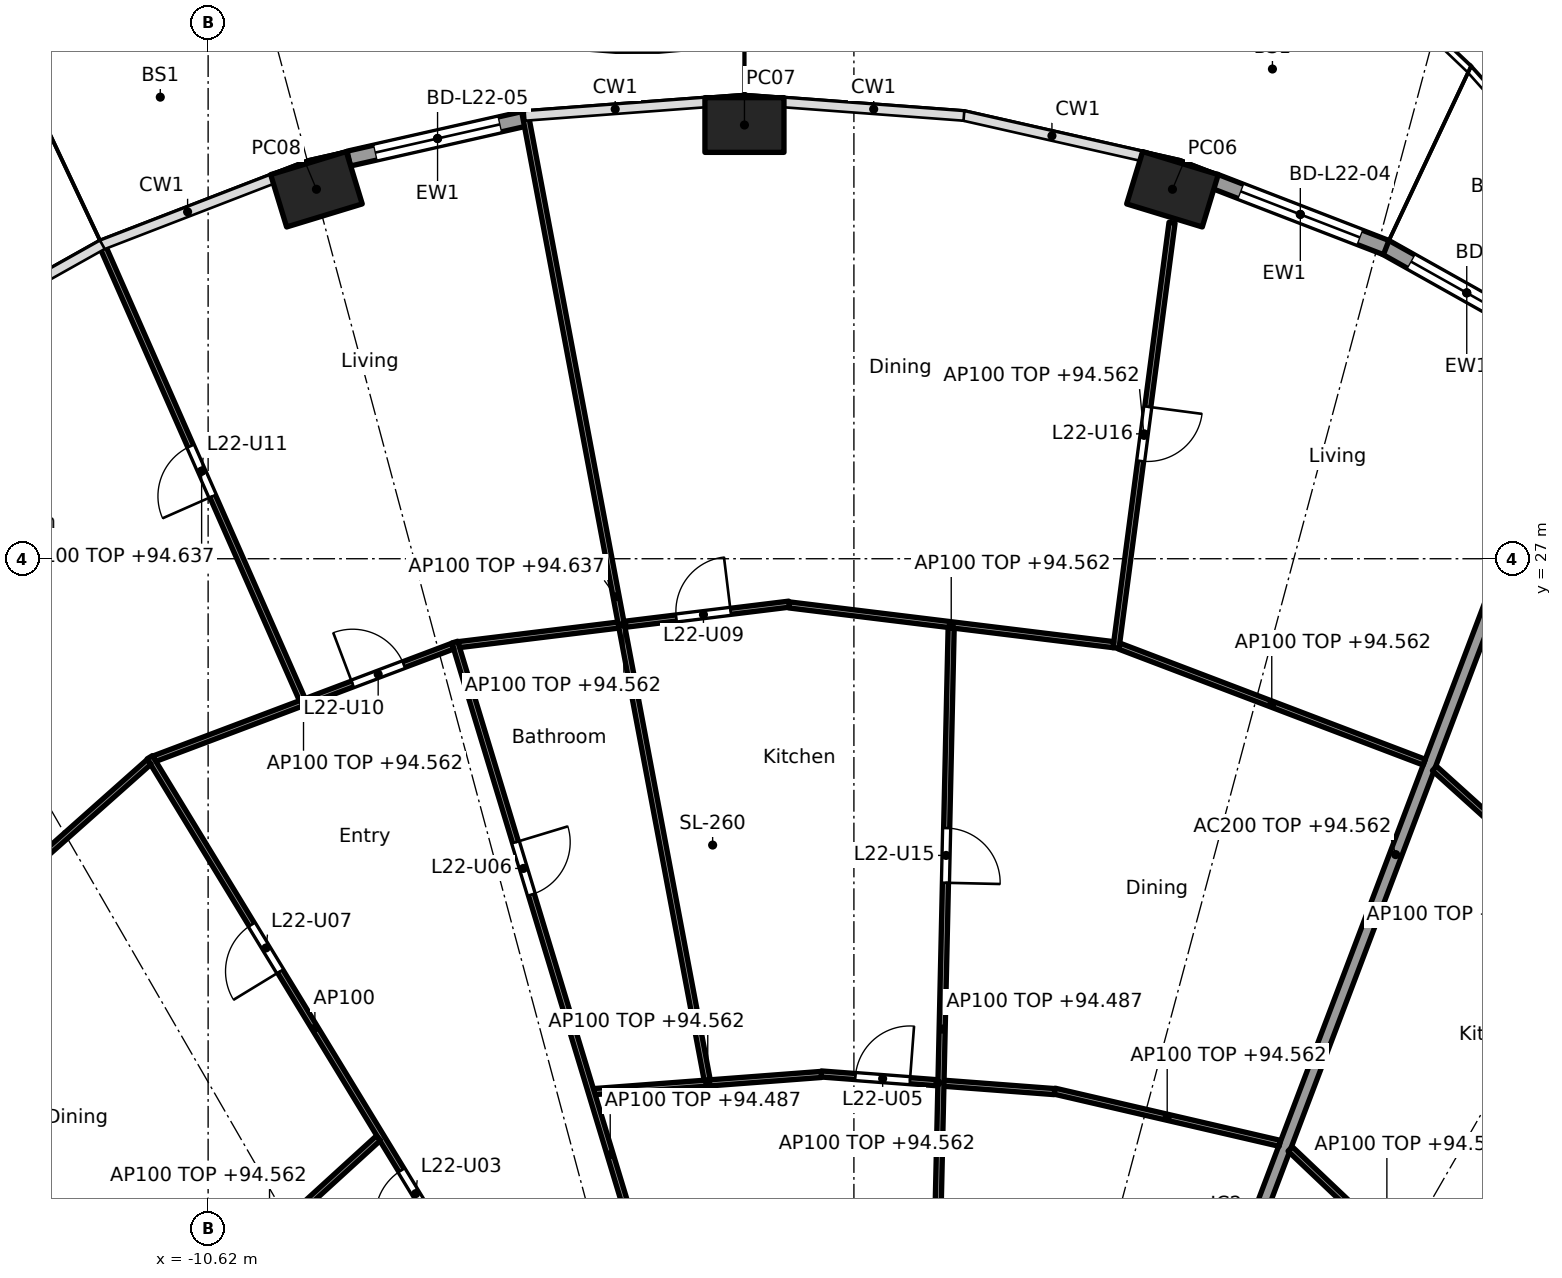
"""IFC4 building model, lengths in metres.
Left out: names, types, materials, properties, quantities, classifications, styles, units other than length and angle.
Written with IfcOpenShell. Run it as: python <this file> out.ifc"""

import sys

from ifc_helpers import new_model, si_unit, direction, frame, frame_2d, origin, origin_2d, place, context, subcontext, project, spatial, rectangle, hollow_rectangle, extrude, element, fill, save


model = new_model("IFC4")
c1 = context("Model", 3, precision=1e-05, world=origin(), true_north=direction((0.0, 1.0)))
c2 = subcontext(c1, "Body", "Model", "MODEL_VIEW")
j1 = project(units=[si_unit("LENGTHUNIT", "METRE"), si_unit("PLANEANGLEUNIT", "RADIAN")], contexts=[c1])
p1 = place(None, origin())
s1 = spatial("IfcSite", under=j1, at=p1, CompositionType="ELEMENT")
p2 = place(p1, origin())
s2 = spatial("IfcBuilding", under=s1, at=p2, CompositionType="ELEMENT")
p3 = place(p2, frame((0.0, 0.0, 91.8)))
s3 = spatial("IfcBuildingStorey", under=s2, at=p3, CompositionType="ELEMENT", Elevation=91.8)
for number, where, z_axis, x_axis in (
    (1, (5.239, 33.076, 0.0), (0.0, 0.0, 1.0), (-0.957, 0.292, 0.0)),
    (2, (-1.8, 34.133, 0.0), (0.0, 0.0, 1.0), (-1.0, 0.0, 0.0)),
    (3, (-8.839, 33.076, 0.0), (0.0, 0.0, 1.0), (-0.957, -0.292, 0.0)),
):
    element("IfcColumn", number, at=place(p3, frame(where, z_axis=z_axis, x_axis=x_axis)), inside=s3, PredefinedType="COLUMN", context=c2, shape_type="SweptSolid", body=[
        extrude(hollow_rectangle(XDim=1.3, YDim=0.9, WallThickness=0.045, at=origin_2d()), origin(), (0.0, 0.0, 1.0), 3.7),
    ])
p4 = place(p3, frame((8.737, 32.125, 0.0), z_axis=(0.0, 0.0, 1.0), x_axis=(0.872071158476, -0.489379090843, 0.0)))
e4 = element("IfcWall", 4, at=p4, inside=s3, PredefinedType="SOLIDWALL", context=c2, shape_type="SweptSolid", body=[
    extrude(rectangle(XDim=3.076, YDim=0.25, at=frame_2d((1.538, 0.0))), origin(), (0.0, 0.0, 1.0), 3.44),
])
p5 = place(p4, frame((0.488, 0.0, 0.0)))
e5 = element("IfcOpeningElement", 5, at=p5, cuts=e4, PredefinedType="OPENING", context=c2, shape_type="SweptSolid", body=[
    extrude(rectangle(XDim=2.1, YDim=2.4, at=frame_2d((1.05, 1.2))), frame((0.0, 0.135, 0.0), z_axis=(0.0, -1.0, 0.0), x_axis=(1.0, 0.0, 0.0)), (0.0, 0.0, 1.0), 0.27),
])
p6 = place(p3, frame((5.929, 33.208, 0.0), z_axis=(0.0, 0.0, 1.0), x_axis=(0.932837560624, -0.360297218263, 0.0)))
e6 = element("IfcWall", 6, at=p6, inside=s3, PredefinedType="SOLIDWALL", context=c2, shape_type="SweptSolid", body=[
    extrude(rectangle(XDim=3.028, YDim=0.25, at=frame_2d((1.514, 0.0))), origin(), (0.0, 0.0, 1.0), 3.44),
])
p7 = place(p6, frame((0.464, 0.0, 0.0)))
e7 = element("IfcOpeningElement", 7, at=p7, cuts=e6, PredefinedType="OPENING", context=c2, shape_type="SweptSolid", body=[
    extrude(rectangle(XDim=2.1, YDim=2.4, at=frame_2d((1.05, 1.2))), frame((0.0, 0.135, 0.0), z_axis=(0.0, -1.0, 0.0), x_axis=(1.0, 0.0, 0.0)), (0.0, 0.0, 1.0), 0.27),
])
p8 = place(p3, frame((-8.306, 33.58, 0.0), z_axis=(0.0, 0.0, 1.0), x_axis=(0.975317607872, 0.220806620767, 0.0)))
e8 = element("IfcWall", 8, at=p8, inside=s3, PredefinedType="SOLIDWALL", context=c2, shape_type="SweptSolid", body=[
    extrude(rectangle(XDim=2.993, YDim=0.25, at=frame_2d((1.497, 0.0))), origin(), (0.0, 0.0, 1.0), 3.44),
])
p9 = place(p8, frame((0.447, 0.0, 0.0)))
e9 = element("IfcOpeningElement", 9, at=p9, cuts=e8, PredefinedType="OPENING", context=c2, shape_type="SweptSolid", body=[
    extrude(rectangle(XDim=2.1, YDim=2.4, at=frame_2d((1.05, 1.2))), frame((0.0, 0.135, 0.0), z_axis=(0.0, -1.0, 0.0), x_axis=(1.0, 0.0, 0.0)), (0.0, 0.0, 1.0), 0.27),
])
p10 = place(p3, frame((6.141, 14.829, 0.0), z_axis=(0.0, 0.0, 1.0), x_axis=(0.354477134193, 0.935064682968, 0.0)))
e10 = element("IfcWall", 10, at=p10, inside=s3, PredefinedType="PARTITIONING", context=c2, shape_type="SweptSolid", body=[
    extrude(rectangle(XDim=15.626, YDim=0.2, at=frame_2d((7.813, 0.0))), origin(), (0.0, 0.0, 1.0), 2.762),
])
p11 = place(p3, frame((10.364, 14.198, 0.0), z_axis=(0.0, 0.0, 1.0), x_axis=(0.552104552927, 0.833774887267, 0.0)))
e11 = element("IfcWall", 11, at=p11, inside=s3, PredefinedType="PARTITIONING", context=c2, shape_type="SweptSolid", body=[
    extrude(rectangle(XDim=12.407, YDim=0.1, at=frame_2d((6.203, 0.0))), origin(), (0.0, 0.0, 1.0), 2.762),
])
p12 = place(p11, frame((8.988, 0.0, 0.0)))
e12 = element("IfcOpeningElement", 12, at=p12, cuts=e11, PredefinedType="OPENING", context=c2, shape_type="SweptSolid", body=[
    extrude(rectangle(XDim=0.9, YDim=2.1, at=frame_2d((0.45, 1.05))), frame((0.0, 0.06, 0.0), z_axis=(0.0, -1.0, 0.0), x_axis=(1.0, 0.0, 0.0)), (0.0, 0.0, 1.0), 0.12),
])
p13 = place(p11, frame((2.809, 0.0, 0.0)))
e13 = element("IfcOpeningElement", 13, at=p13, cuts=e11, PredefinedType="OPENING", context=c2, shape_type="SweptSolid", body=[
    extrude(rectangle(XDim=0.9, YDim=2.1, at=frame_2d((0.45, 1.05))), frame((0.0, 0.06, 0.0), z_axis=(0.0, -1.0, 0.0), x_axis=(1.0, 0.0, 0.0)), (0.0, 0.0, 1.0), 0.12),
])
p14 = place(p3, frame((10.355, 14.274, 0.0), z_axis=(0.0, 0.0, 1.0), x_axis=(-0.725206433622, 0.688531501555, 0.0)))
e14 = element("IfcWall", 14, at=p14, inside=s3, PredefinedType="PARTITIONING", context=c2, shape_type="SweptSolid", body=[
    extrude(rectangle(XDim=4.387, YDim=0.1, at=frame_2d((2.193, 0.0))), origin(), (0.0, 0.0, 1.0), 2.762),
])
p15 = place(p14, frame((0.907, 0.0, 0.0)))
e15 = element("IfcOpeningElement", 15, at=p15, cuts=e14, PredefinedType="OPENING", context=c2, shape_type="SweptSolid", body=[
    extrude(rectangle(XDim=0.9, YDim=2.1, at=frame_2d((0.45, 1.05))), frame((0.0, 0.06, 0.0), z_axis=(0.0, -1.0, 0.0), x_axis=(1.0, 0.0, 0.0)), (0.0, 0.0, 1.0), 0.12),
])
p16 = place(p3, frame((13.898, 19.625, 0.0), z_axis=(0.0, 0.0, 1.0), x_axis=(-0.742396654702, 0.669960601146, 0.0)))
e16 = element("IfcWall", 16, at=p16, inside=s3, PredefinedType="PARTITIONING", context=c2, shape_type="SweptSolid", body=[
    extrude(rectangle(XDim=5.861, YDim=0.1, at=frame_2d((2.931, 0.0))), origin(), (0.0, 0.0, 1.0), 2.762),
])
p17 = place(p3, frame((7.004, 17.386, 0.0), z_axis=(0.0, 0.0, 1.0), x_axis=(-0.974179728512, 0.225773905837, 0.0)))
e17 = element("IfcWall", 17, at=p17, inside=s3, PredefinedType="PARTITIONING", context=c2, shape_type="SweptSolid", body=[
    extrude(rectangle(XDim=3.802, YDim=0.1, at=frame_2d((1.901, 0.0))), origin(), (0.0, 0.0, 1.0), 2.762),
])
p18 = place(p3, frame((9.379, 23.655, 0.0), z_axis=(0.0, 0.0, 1.0), x_axis=(-0.934613076136, 0.355666132653, 0.0)))
e18 = element("IfcWall", 18, at=p18, inside=s3, PredefinedType="PARTITIONING", context=c2, shape_type="SweptSolid", body=[
    extrude(rectangle(XDim=5.366, YDim=0.1, at=frame_2d((2.683, 0.0))), origin(), (0.0, 0.0, 1.0), 2.762),
])
p19 = place(p3, frame((3.299, 18.237, 0.0), z_axis=(0.0, 0.0, 1.0), x_axis=(-0.997152243414, 0.075414875552, 0.0)))
e19 = element("IfcWall", 19, at=p19, inside=s3, PredefinedType="PARTITIONING", context=c2, shape_type="SweptSolid", body=[
    extrude(rectangle(XDim=3.846, YDim=0.1, at=frame_2d((1.923, 0.0))), origin(), (0.0, 0.0, 1.0), 2.762),
])
p20 = place(p19, frame((2.385, 0.0, 0.0)))
e20 = element("IfcOpeningElement", 20, at=p20, cuts=e19, PredefinedType="OPENING", context=c2, shape_type="SweptSolid", body=[
    extrude(rectangle(XDim=0.9, YDim=2.1, at=frame_2d((0.45, 1.05))), frame((0.0, 0.06, 0.0), z_axis=(0.0, -1.0, 0.0), x_axis=(1.0, 0.0, 0.0)), (0.0, 0.0, 1.0), 0.12),
])
p21 = place(p3, frame((4.311, 25.531, 0.0), z_axis=(0.0, 0.0, 1.0), x_axis=(0.130604008227, 0.991434613595, 0.0)))
e21 = element("IfcWall", 21, at=p21, inside=s3, PredefinedType="PARTITIONING", context=c2, shape_type="SweptSolid", body=[
    extrude(rectangle(XDim=7.055, YDim=0.1, at=frame_2d((3.527, 0.0))), origin(), (0.0, 0.0, 1.0), 2.762),
])
p22 = place(p21, frame((3.102, 0.0, 0.0)))
e22 = element("IfcOpeningElement", 22, at=p22, cuts=e21, PredefinedType="OPENING", context=c2, shape_type="SweptSolid", body=[
    extrude(rectangle(XDim=0.9, YDim=2.1, at=frame_2d((0.45, 1.05))), frame((0.0, 0.06, 0.0), z_axis=(0.0, -1.0, 0.0), x_axis=(1.0, 0.0, 0.0)), (0.0, 0.0, 1.0), 0.12),
])
p23 = place(p3, frame((4.267, 25.587, 0.0), z_axis=(0.0, 0.0, 1.0), x_axis=(-0.992576206119, 0.121624319302, 0.0)))
e23 = element("IfcWall", 23, at=p23, inside=s3, PredefinedType="PARTITIONING", context=c2, shape_type="SweptSolid", body=[
    extrude(rectangle(XDim=5.374, YDim=0.1, at=frame_2d((2.687, 0.0))), origin(), (0.0, 0.0, 1.0), 2.762),
])
p24 = place(p3, frame((1.303, 12.665, 0.0), z_axis=(0.0, 0.0, 1.0), x_axis=(0.022412244057, 0.999748814111, 0.0)))
e24 = element("IfcWall", 24, at=p24, inside=s3, PredefinedType="PARTITIONING", context=c2, shape_type="SweptSolid", body=[
    extrude(rectangle(XDim=13.203, YDim=0.1, at=frame_2d((6.601, 0.0))), origin(), (0.0, 0.0, 1.0), 2.687),
])
p25 = place(p24, frame((2.407, 0.0, 0.0)))
e25 = element("IfcOpeningElement", 25, at=p25, cuts=e24, PredefinedType="OPENING", context=c2, shape_type="SweptSolid", body=[
    extrude(rectangle(XDim=0.9, YDim=2.1, at=frame_2d((0.45, 1.05))), frame((0.0, 0.06, 0.0), z_axis=(0.0, -1.0, 0.0), x_axis=(1.0, 0.0, 0.0)), (0.0, 0.0, 1.0), 0.12),
])
p26 = place(p24, frame((9.009, 0.0, 0.0)))
e26 = element("IfcOpeningElement", 26, at=p26, cuts=e24, PredefinedType="OPENING", context=c2, shape_type="SweptSolid", body=[
    extrude(rectangle(XDim=0.9, YDim=2.1, at=frame_2d((0.45, 1.05))), frame((0.0, 0.06, 0.0), z_axis=(0.0, -1.0, 0.0), x_axis=(1.0, 0.0, 0.0)), (0.0, 0.0, 1.0), 0.12),
])
p27 = place(p3, frame((-0.536, 18.519, 0.0), z_axis=(0.0, 0.0, 1.0), x_axis=(-0.99715294352, -0.075405618017, 0.0)))
e27 = element("IfcWall", 27, at=p27, inside=s3, PredefinedType="PARTITIONING", context=c2, shape_type="SweptSolid", body=[
    extrude(rectangle(XDim=3.746, YDim=0.1, at=frame_2d((1.873, 0.0))), origin(), (0.0, 0.0, 1.0), 2.762),
])
p28 = place(p3, frame((-1.066, 26.253, 0.0), z_axis=(0.0, 0.0, 1.0), x_axis=(-0.992574853421, -0.121635358166, 0.0)))
e28 = element("IfcWall", 28, at=p28, inside=s3, PredefinedType="PARTITIONING", context=c2, shape_type="SweptSolid", body=[
    extrude(rectangle(XDim=5.473, YDim=0.1, at=frame_2d((2.737, 0.0))), origin(), (0.0, 0.0, 1.0), 2.762),
])
p29 = place(p28, frame((0.969, 0.0, 0.0)))
e29 = element("IfcOpeningElement", 29, at=p29, cuts=e28, PredefinedType="OPENING", context=c2, shape_type="SweptSolid", body=[
    extrude(rectangle(XDim=0.9, YDim=2.1, at=frame_2d((0.45, 1.05))), frame((0.0, 0.06, 0.0), z_axis=(0.0, -1.0, 0.0), x_axis=(1.0, 0.0, 0.0)), (0.0, 0.0, 1.0), 0.12),
])
p30 = place(p3, frame((-2.413, 18.427, 0.0), z_axis=(0.0, 0.0, 1.0), x_axis=(-0.185126823719, 0.982714637695, 0.0)))
e30 = element("IfcWall", 30, at=p30, inside=s3, PredefinedType="PARTITIONING", context=c2, shape_type="SweptSolid", body=[
    extrude(rectangle(XDim=16.176, YDim=0.1, at=frame_2d((8.088, 0.0))), origin(), (0.0, 0.0, 1.0), 2.837),
])
p31 = place(p3, frame((-2.631, 12.66, 0.0), z_axis=(0.0, 0.0, 1.0), x_axis=(-0.290161396499, 0.956977723869, 0.0)))
e31 = element("IfcWall", 31, at=p31, inside=s3, PredefinedType="PARTITIONING", context=c2, shape_type="SweptSolid", body=[
    extrude(rectangle(XDim=13.552, YDim=0.1, at=frame_2d((6.776, 0.0))), origin(), (0.0, 0.0, 1.0), 2.687),
])
p32 = place(p31, frame((0.772, 0.0, 0.0)))
e32 = element("IfcOpeningElement", 32, at=p32, cuts=e31, PredefinedType="OPENING", context=c2, shape_type="SweptSolid", body=[
    extrude(rectangle(XDim=0.9, YDim=2.1, at=frame_2d((0.45, 1.05))), frame((0.0, 0.06, 0.0), z_axis=(0.0, -1.0, 0.0), x_axis=(1.0, 0.0, 0.0)), (0.0, 0.0, 1.0), 0.12),
])
p33 = place(p31, frame((9.212, 0.0, 0.0)))
e33 = element("IfcOpeningElement", 33, at=p33, cuts=e31, PredefinedType="OPENING", context=c2, shape_type="SweptSolid", body=[
    extrude(rectangle(XDim=0.9, YDim=2.1, at=frame_2d((0.45, 1.05))), frame((0.0, 0.06, 0.0), z_axis=(0.0, -1.0, 0.0), x_axis=(1.0, 0.0, 0.0)), (0.0, 0.0, 1.0), 0.12),
])
p34 = place(p3, frame((-6.596, 25.563, 0.0), z_axis=(0.0, 0.0, 1.0), x_axis=(-0.9356162121, -0.353018843201, 0.0)))
e34 = element("IfcWall", 34, at=p34, inside=s3, PredefinedType="PARTITIONING", context=c2, shape_type="SweptSolid", body=[
    extrude(rectangle(XDim=5.249, YDim=0.1, at=frame_2d((2.625, 0.0))), origin(), (0.0, 0.0, 1.0), 2.762),
])
p35 = place(p34, frame((0.862, 0.0, 0.0)))
e35 = element("IfcOpeningElement", 35, at=p35, cuts=e34, PredefinedType="OPENING", context=c2, shape_type="SweptSolid", body=[
    extrude(rectangle(XDim=0.9, YDim=2.1, at=frame_2d((0.45, 1.05))), frame((0.0, 0.06, 0.0), z_axis=(0.0, -1.0, 0.0), x_axis=(1.0, 0.0, 0.0)), (0.0, 0.0, 1.0), 0.12),
])
p36 = place(p3, frame((-9.072, 24.683, 0.0), z_axis=(0.0, 0.0, 1.0), x_axis=(-0.403192911159, 0.915115007194, 0.0)))
e36 = element("IfcWall", 36, at=p36, inside=s3, PredefinedType="PARTITIONING", context=c2, shape_type="SweptSolid", body=[
    extrude(rectangle(XDim=8.211, YDim=0.1, at=frame_2d((4.106, 0.0))), origin(), (0.0, 0.0, 1.0), 2.837),
])
p37 = place(p36, frame((3.656, 0.0, 0.0)))
e37 = element("IfcOpeningElement", 37, at=p37, cuts=e36, PredefinedType="OPENING", context=c2, shape_type="SweptSolid", body=[
    extrude(rectangle(XDim=0.9, YDim=2.1, at=frame_2d((0.45, 1.05))), frame((0.0, 0.06, 0.0), z_axis=(0.0, -1.0, 0.0), x_axis=(1.0, 0.0, 0.0)), (0.0, 0.0, 1.0), 0.12),
])
p38 = place(p3, frame((-6.149, 14.825, 0.0), z_axis=(0.0, 0.0, 1.0), x_axis=(-0.520411490252, 0.853915616917, 0.0)))
e38 = element("IfcWall", 38, at=p38, inside=s3, PredefinedType="PARTITIONING", context=c2, shape_type="SweptSolid", body=[
    extrude(rectangle(XDim=10.435, YDim=0.1, at=frame_2d((5.218, 0.0))), origin(), (0.0, 0.0, 1.0), 3.44),
])
p39 = place(p38, frame((1.582, 0.0, 0.0)))
e39 = element("IfcOpeningElement", 39, at=p39, cuts=e38, PredefinedType="OPENING", context=c2, shape_type="SweptSolid", body=[
    extrude(rectangle(XDim=0.9, YDim=2.1, at=frame_2d((0.45, 1.05))), frame((0.0, 0.06, 0.0), z_axis=(0.0, -1.0, 0.0), x_axis=(1.0, 0.0, 0.0)), (0.0, 0.0, 1.0), 0.12),
])
p40 = place(p38, frame((6.312, 0.0, 0.0)))
e40 = element("IfcOpeningElement", 40, at=p40, cuts=e38, PredefinedType="OPENING", context=c2, shape_type="SweptSolid", body=[
    extrude(rectangle(XDim=0.9, YDim=2.1, at=frame_2d((0.45, 1.05))), frame((0.0, 0.06, 0.0), z_axis=(0.0, -1.0, 0.0), x_axis=(1.0, 0.0, 0.0)), (0.0, 0.0, 1.0), 0.12),
])
p41 = place(p3, frame((-7.82, 17.472, 0.0), z_axis=(0.0, 0.0, 1.0), x_axis=(-0.73885182489, -0.67386792538, 0.0)))
e41 = element("IfcWall", 41, at=p41, inside=s3, PredefinedType="PARTITIONING", context=c2, shape_type="SweptSolid", body=[
    extrude(rectangle(XDim=4.846, YDim=0.1, at=frame_2d((2.423, 0.0))), origin(), (0.0, 0.0, 1.0), 2.762),
])
p42 = place(p3, frame((-11.591, 23.66, 0.0), z_axis=(0.0, 0.0, 1.0), x_axis=(-0.747429278403, -0.664341383466, 0.0)))
e42 = element("IfcWall", 42, at=p42, inside=s3, PredefinedType="PARTITIONING", context=c2, shape_type="SweptSolid", body=[
    extrude(rectangle(XDim=6.073, YDim=0.1, at=frame_2d((3.037, 0.0))), origin(), (0.0, 0.0, 1.0), 2.762),
])
p43 = place(p5, origin())
e43 = element("IfcDoor", 43, at=p43, inside=s3, OperationType="SLIDING_TO_LEFT", PredefinedType="DOOR", context=c2, shape_type="SweptSolid", body=[
    extrude(rectangle(XDim=2.1, YDim=2.4, at=frame_2d((1.05, 1.2))), frame((0.0, 0.025, 0.0), z_axis=(0.0, -1.0, 0.0), x_axis=(1.0, 0.0, 0.0)), (0.0, 0.0, 1.0), 0.05),
])
fill(e5, e43)
p44 = place(p7, origin())
e44 = element("IfcDoor", 44, at=p44, inside=s3, OperationType="SLIDING_TO_LEFT", PredefinedType="DOOR", context=c2, shape_type="SweptSolid", body=[
    extrude(rectangle(XDim=2.1, YDim=2.4, at=frame_2d((1.05, 1.2))), frame((0.0, 0.025, 0.0), z_axis=(0.0, -1.0, 0.0), x_axis=(1.0, 0.0, 0.0)), (0.0, 0.0, 1.0), 0.05),
])
fill(e7, e44)
p45 = place(p9, origin())
e45 = element("IfcDoor", 45, at=p45, inside=s3, OperationType="SLIDING_TO_LEFT", PredefinedType="DOOR", context=c2, shape_type="SweptSolid", body=[
    extrude(rectangle(XDim=2.1, YDim=2.4, at=frame_2d((1.05, 1.2))), frame((0.0, 0.025, 0.0), z_axis=(0.0, -1.0, 0.0), x_axis=(1.0, 0.0, 0.0)), (0.0, 0.0, 1.0), 0.05),
])
fill(e9, e45)
p46 = place(p39, origin())
e46 = element("IfcDoor", 46, at=p46, inside=s3, OperationType="SINGLE_SWING_LEFT", PredefinedType="DOOR", context=c2, shape_type="SweptSolid", body=[
    extrude(rectangle(XDim=0.9, YDim=2.1, at=frame_2d((0.45, 1.05))), frame((0.0, 0.025, 0.0), z_axis=(0.0, -1.0, 0.0), x_axis=(1.0, 0.0, 0.0)), (0.0, 0.0, 1.0), 0.05),
])
fill(e39, e46)
p47 = place(p20, frame((0.9, 0.0, 0.0), x_axis=(-1.0, 0.0, 0.0)))
e47 = element("IfcDoor", 47, at=p47, inside=s3, OperationType="SINGLE_SWING_RIGHT", PredefinedType="DOOR", context=c2, shape_type="SweptSolid", body=[
    extrude(rectangle(XDim=0.9, YDim=2.1, at=frame_2d((0.45, 1.05))), frame((0.0, 0.025, 0.0), z_axis=(0.0, -1.0, 0.0), x_axis=(1.0, 0.0, 0.0)), (0.0, 0.0, 1.0), 0.05),
])
fill(e20, e47)
p48 = place(p33, frame((0.9, 0.0, 0.0), x_axis=(-1.0, 0.0, 0.0)))
e48 = element("IfcDoor", 48, at=p48, inside=s3, OperationType="SINGLE_SWING_LEFT", PredefinedType="DOOR", context=c2, shape_type="SweptSolid", body=[
    extrude(rectangle(XDim=0.9, YDim=2.1, at=frame_2d((0.45, 1.05))), frame((0.0, 0.025, 0.0), z_axis=(0.0, -1.0, 0.0), x_axis=(1.0, 0.0, 0.0)), (0.0, 0.0, 1.0), 0.05),
])
fill(e33, e48)
p49 = place(p40, origin())
e49 = element("IfcDoor", 49, at=p49, inside=s3, OperationType="SINGLE_SWING_LEFT", PredefinedType="DOOR", context=c2, shape_type="SweptSolid", body=[
    extrude(rectangle(XDim=0.9, YDim=2.1, at=frame_2d((0.45, 1.05))), frame((0.0, 0.025, 0.0), z_axis=(0.0, -1.0, 0.0), x_axis=(1.0, 0.0, 0.0)), (0.0, 0.0, 1.0), 0.05),
])
fill(e40, e49)
p50 = place(p29, frame((0.9, 0.0, 0.0), x_axis=(-1.0, 0.0, 0.0)))
e50 = element("IfcDoor", 50, at=p50, inside=s3, OperationType="SINGLE_SWING_RIGHT", PredefinedType="DOOR", context=c2, shape_type="SweptSolid", body=[
    extrude(rectangle(XDim=0.9, YDim=2.1, at=frame_2d((0.45, 1.05))), frame((0.0, 0.025, 0.0), z_axis=(0.0, -1.0, 0.0), x_axis=(1.0, 0.0, 0.0)), (0.0, 0.0, 1.0), 0.05),
])
fill(e29, e50)
p51 = place(p35, frame((0.9, 0.0, 0.0), x_axis=(-1.0, 0.0, 0.0)))
e51 = element("IfcDoor", 51, at=p51, inside=s3, OperationType="SINGLE_SWING_LEFT", PredefinedType="DOOR", context=c2, shape_type="SweptSolid", body=[
    extrude(rectangle(XDim=0.9, YDim=2.1, at=frame_2d((0.45, 1.05))), frame((0.0, 0.025, 0.0), z_axis=(0.0, -1.0, 0.0), x_axis=(1.0, 0.0, 0.0)), (0.0, 0.0, 1.0), 0.05),
])
fill(e35, e51)
p52 = place(p37, origin())
e52 = element("IfcDoor", 52, at=p52, inside=s3, OperationType="SINGLE_SWING_LEFT", PredefinedType="DOOR", context=c2, shape_type="SweptSolid", body=[
    extrude(rectangle(XDim=0.9, YDim=2.1, at=frame_2d((0.45, 1.05))), frame((0.0, 0.025, 0.0), z_axis=(0.0, -1.0, 0.0), x_axis=(1.0, 0.0, 0.0)), (0.0, 0.0, 1.0), 0.05),
])
fill(e37, e52)
p53 = place(p26, frame((0.9, 0.0, 0.0), x_axis=(-1.0, 0.0, 0.0)))
e53 = element("IfcDoor", 53, at=p53, inside=s3, OperationType="SINGLE_SWING_RIGHT", PredefinedType="DOOR", context=c2, shape_type="SweptSolid", body=[
    extrude(rectangle(XDim=0.9, YDim=2.1, at=frame_2d((0.45, 1.05))), frame((0.0, 0.025, 0.0), z_axis=(0.0, -1.0, 0.0), x_axis=(1.0, 0.0, 0.0)), (0.0, 0.0, 1.0), 0.05),
])
fill(e26, e53)
p54 = place(p22, frame((0.9, 0.0, 0.0), x_axis=(-1.0, 0.0, 0.0)))
e54 = element("IfcDoor", 54, at=p54, inside=s3, OperationType="SINGLE_SWING_LEFT", PredefinedType="DOOR", context=c2, shape_type="SweptSolid", body=[
    extrude(rectangle(XDim=0.9, YDim=2.1, at=frame_2d((0.45, 1.05))), frame((0.0, 0.025, 0.0), z_axis=(0.0, -1.0, 0.0), x_axis=(1.0, 0.0, 0.0)), (0.0, 0.0, 1.0), 0.05),
])
fill(e22, e54)
save(model, sys.argv[1])
